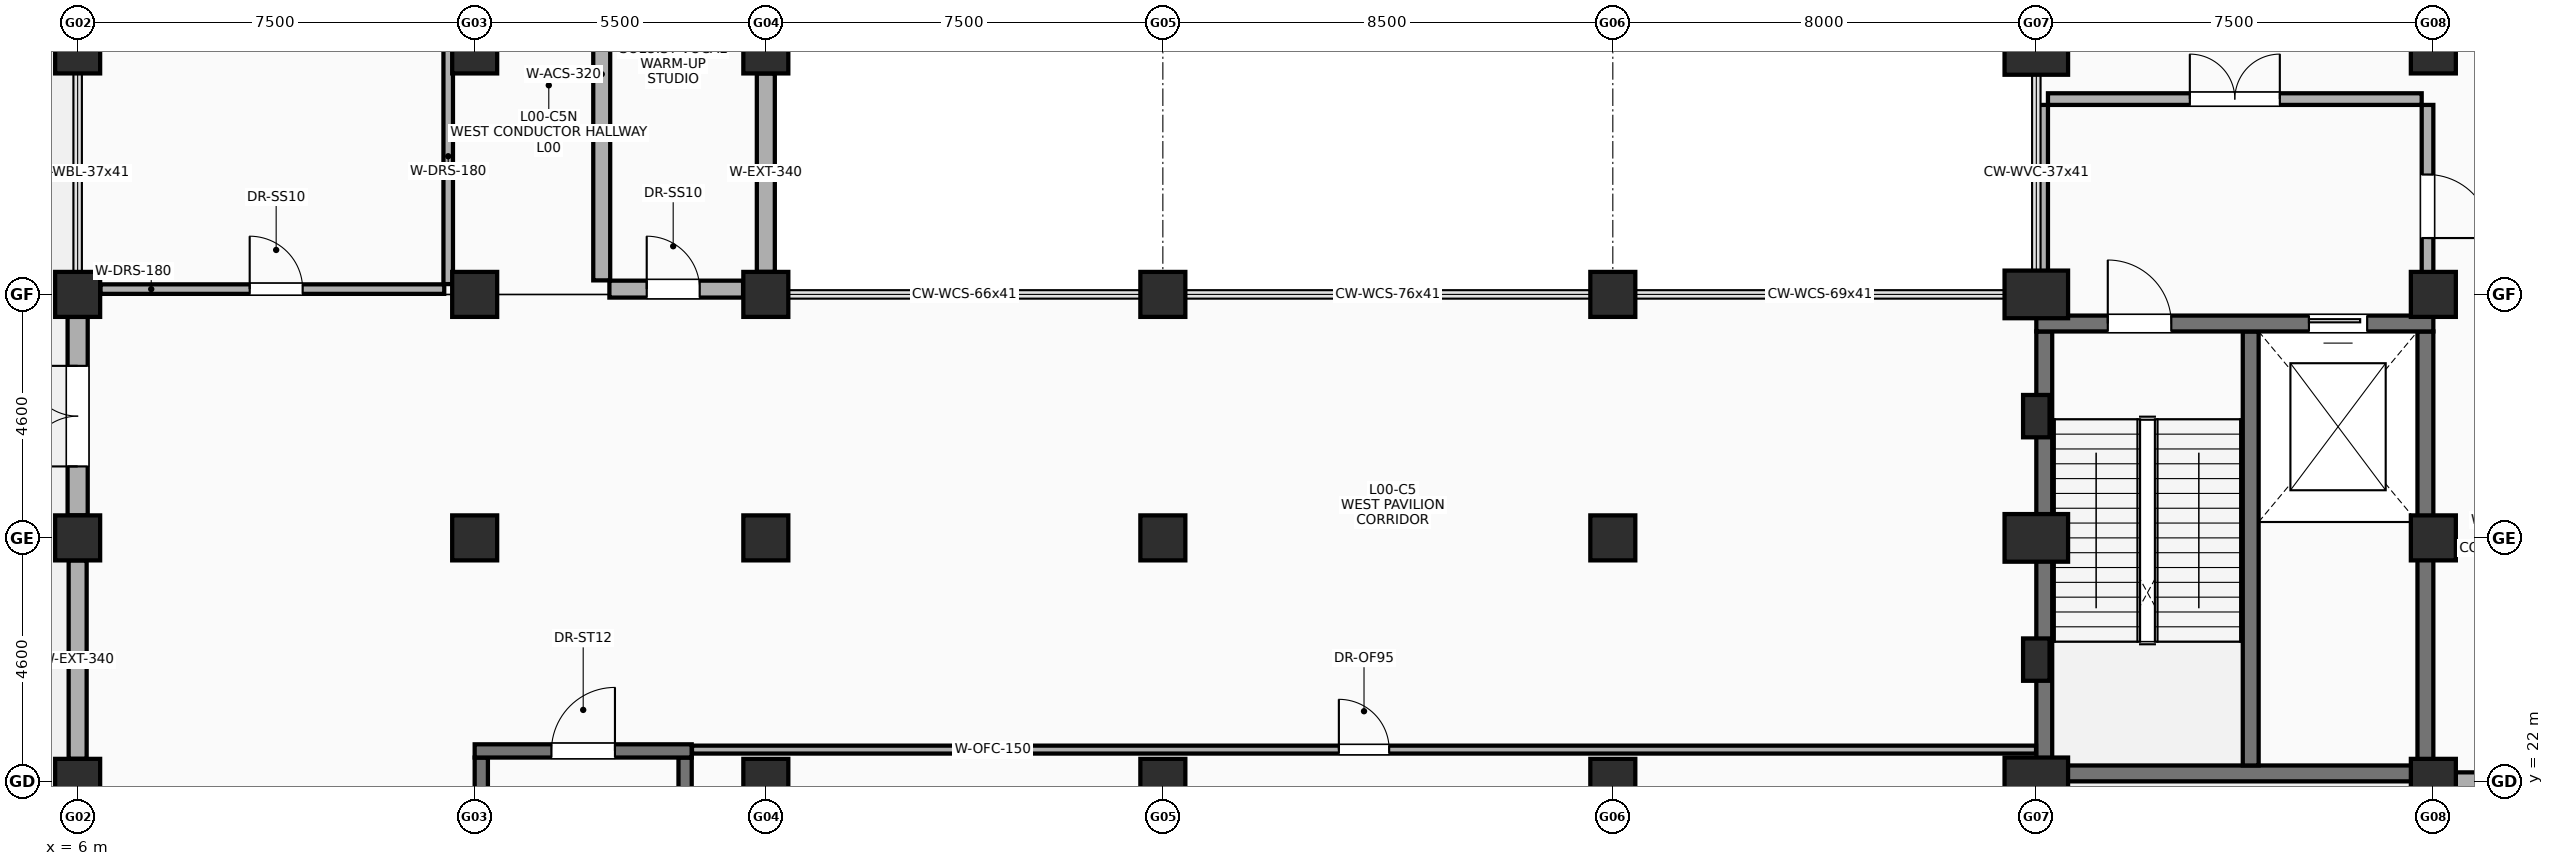
"""IFC4 building model, lengths in metres.
Left out: names, types, materials, properties, quantities, classifications, styles, units other than length and angle.
Written with IfcOpenShell. Run it as: python <this file> out.ifc"""

import sys

from ifc_helpers import new_model, si_unit, direction, frame, frame_2d, origin, origin_2d, place, context, subcontext, project, spatial, rectangle, extrude, element, fill, save


model = new_model("IFC4")
c1 = context("Model", 3, precision=1e-05, world=origin(), true_north=direction((0.0, 1.0)))
c2 = subcontext(c1, "Body", "Model", "MODEL_VIEW")
j1 = project(units=[si_unit("LENGTHUNIT", "METRE"), si_unit("PLANEANGLEUNIT", "RADIAN")], contexts=[c1])
p1 = place(None, origin())
s1 = spatial("IfcSite", under=j1, at=p1, CompositionType="ELEMENT")
p2 = place(p1, origin())
s2 = spatial("IfcBuilding", under=s1, at=p2, CompositionType="ELEMENT")
p3 = place(p2, origin())
s3 = spatial("IfcBuildingStorey", under=s2, at=p3, CompositionType="ELEMENT", Elevation=0.0)
for number, where, z_axis, x_axis in (
    (1, (6.0, 22.0, 0.0), (0.0, 0.0, 1.0), (1.0, 0.0, 0.0)),
    (2, (6.0, 26.6, 0.0), (0.0, 0.0, 1.0), (1.0, 0.0, 0.0)),
    (3, (6.0, 31.2, 0.0), (0.0, 0.0, 1.0), (1.0, 0.0, 0.0)),
    (4, (6.0, 35.8, 0.0), (0.0, 0.0, 1.0), (1.0, 0.0, 0.0)),
    (5, (13.5, 26.6, 0.0), (0.0, 0.0, 1.0), (1.0, 0.0, 0.0)),
    (6, (13.5, 31.2, 0.0), (0.0, 0.0, 1.0), (1.0, 0.0, 0.0)),
    (7, (13.5, 35.8, 0.0), (0.0, 0.0, 1.0), (1.0, 0.0, 0.0)),
    (8, (19.0, 22.0, 0.0), (0.0, 0.0, 1.0), (1.0, 0.0, 0.0)),
    (9, (19.0, 26.6, 0.0), (0.0, 0.0, 1.0), (1.0, 0.0, 0.0)),
    (10, (19.0, 31.2, 0.0), (0.0, 0.0, 1.0), (1.0, 0.0, 0.0)),
    (11, (19.0, 35.8, 0.0), (0.0, 0.0, 1.0), (1.0, 0.0, 0.0)),
    (12, (26.5, 22.0, 0.0), (0.0, 0.0, 1.0), (1.0, 0.0, 0.0)),
    (13, (26.5, 26.6, 0.0), (0.0, 0.0, 1.0), (1.0, 0.0, 0.0)),
    (14, (26.5, 31.2, 0.0), (0.0, 0.0, 1.0), (1.0, 0.0, 0.0)),
    (15, (35.0, 22.0, 0.0), (0.0, 0.0, 1.0), (1.0, 0.0, 0.0)),
    (16, (35.0, 26.6, 0.0), (0.0, 0.0, 1.0), (1.0, 0.0, 0.0)),
    (17, (35.0, 31.2, 0.0), (0.0, 0.0, 1.0), (1.0, 0.0, 0.0)),
):
    element("IfcColumn", number, at=place(p3, frame(where, z_axis=z_axis, x_axis=x_axis)), inside=s3, PredefinedType="COLUMN", context=c2, shape_type="SweptSolid", body=[
        extrude(rectangle(XDim=0.85, YDim=0.85, at=origin_2d()), origin(), (0.0, 0.0, 1.0), 5.4),
    ])
for number, where, z_axis, x_axis in (
    (18, (43.0, 22.0, 0.0), (0.0, 0.0, 1.0), (1.0, 0.0, 0.0)),
    (19, (43.0, 26.6, 0.0), (0.0, 0.0, 1.0), (1.0, 0.0, 0.0)),
    (20, (43.0, 31.2, 0.0), (0.0, 0.0, 1.0), (1.0, 0.0, 0.0)),
    (21, (43.0, 35.8, 0.0), (0.0, 0.0, 1.0), (1.0, 0.0, 0.0)),
):
    element("IfcColumn", number, at=place(p3, frame(where, z_axis=z_axis, x_axis=x_axis)), inside=s3, PredefinedType="COLUMN", context=c2, shape_type="SweptSolid", body=[
        extrude(rectangle(XDim=1.2, YDim=0.9, at=origin_2d()), origin(), (0.0, 0.0, 1.0), 5.4),
    ])
for number, where, z_axis, x_axis in (
    (22, (50.5, 22.0, 0.0), (0.0, 0.0, 1.0), (1.0, 0.0, 0.0)),
    (23, (50.5, 26.6, 0.0), (0.0, 0.0, 1.0), (1.0, 0.0, 0.0)),
    (24, (50.5, 31.2, 0.0), (0.0, 0.0, 1.0), (1.0, 0.0, 0.0)),
    (25, (50.5, 35.8, 0.0), (0.0, 0.0, 1.0), (1.0, 0.0, 0.0)),
):
    element("IfcColumn", number, at=place(p3, frame(where, z_axis=z_axis, x_axis=x_axis)), inside=s3, PredefinedType="COLUMN", context=c2, shape_type="SweptSolid", body=[
        extrude(rectangle(XDim=0.85, YDim=0.85, at=origin_2d()), origin(), (0.0, 0.0, 1.0), 5.4),
    ])
for number, where, z_axis, x_axis in (
    (26, (43.0, 24.3, 0.0), (0.0, 0.0, 1.0), (1.0, 0.0, 0.0)),
    (27, (43.0, 28.9, 0.0), (0.0, 0.0, 1.0), (1.0, 0.0, 0.0)),
):
    element("IfcColumn", number, at=place(p3, frame(where, z_axis=z_axis, x_axis=x_axis)), inside=s3, PredefinedType="PILASTER", context=c2, shape_type="SweptSolid", body=[
        extrude(rectangle(XDim=0.5, YDim=0.8, at=origin_2d()), origin(), (0.0, 0.0, 1.0), 5.4),
    ])
p4 = place(p3, frame((43.0, 22.15, 0.0), z_axis=(0.0, 0.0, 1.0), x_axis=(1.0, 0.0, 0.0)))
e28 = element("IfcWall", 28, at=p4, inside=s3, PredefinedType="SHEAR", context=c2, shape_type="SweptSolid", body=[
    extrude(rectangle(XDim=7.5, YDim=0.3, at=frame_2d((3.75, 0.0))), origin(), (0.0, 0.0, 1.0), 5.4),
])
for number, where, z_axis, x_axis in (
    (29, (43.15, 22.3, 0.0), (0.0, 0.0, 1.0), (0.0, 1.0, 0.0)),
    (30, (50.35, 22.3, 0.0), (0.0, 0.0, 1.0), (0.0, 1.0, 0.0)),
    (31, (47.05, 22.3, 0.0), (0.0, 0.0, 1.0), (0.0, 1.0, 0.0)),
):
    element("IfcWall", number, at=place(p3, frame(where, z_axis=z_axis, x_axis=x_axis)), inside=s3, PredefinedType="SHEAR", context=c2, shape_type="SweptSolid", body=[
        extrude(rectangle(XDim=8.2, YDim=0.3, at=frame_2d((4.1, 0.0))), origin(), (0.0, 0.0, 1.0), 5.4),
    ])
p5 = place(p3, frame((6.0, 27.025, 0.0), z_axis=(0.0, 0.0, 1.0), x_axis=(0.0, 1.0, 0.0)))
e32 = element("IfcWall", 32, at=p5, inside=s3, PredefinedType="SOLIDWALL", context=c2, shape_type="SweptSolid", body=[
    extrude(rectangle(XDim=3.75, YDim=0.38, at=frame_2d((1.875, 0.0))), origin(), (0.0, 0.0, 1.0), 4.15),
])
p6 = place(p5, frame((0.925, 0.0, 0.0)))
e33 = element("IfcOpeningElement", 33, at=p6, cuts=e32, PredefinedType="OPENING", context=c2, shape_type="SweptSolid", body=[
    extrude(rectangle(XDim=1.9, YDim=2.35, at=frame_2d((0.95, 1.175))), frame((0.0, 0.2, 0.0), z_axis=(0.0, -1.0, 0.0), x_axis=(1.0, 0.0, 0.0)), (0.0, 0.0, 1.0), 0.4),
])
for number, where, z_axis, x_axis in (
    (34, (6.0, 22.425, 0.0), (0.0, 0.0, 1.0), (0.0, 1.0, 0.0)),
    (35, (19.0, 31.625, 0.0), (0.0, 0.0, 1.0), (0.0, 1.0, 0.0)),
):
    element("IfcWall", number, at=place(p3, frame(where, z_axis=z_axis, x_axis=x_axis)), inside=s3, PredefinedType="SOLIDWALL", context=c2, shape_type="SweptSolid", body=[
        extrude(rectangle(XDim=3.75, YDim=0.34, at=frame_2d((1.875, 0.0))), origin(), (0.0, 0.0, 1.0), 4.15),
    ])
p7 = place(p3, frame((43.0, 30.65, 0.0), z_axis=(0.0, 0.0, 1.0), x_axis=(1.0, 0.0, 0.0)))
e36 = element("IfcWall", 36, at=p7, inside=s3, PredefinedType="SHEAR", context=c2, shape_type="SweptSolid", body=[
    extrude(rectangle(XDim=7.5, YDim=0.3, at=frame_2d((3.75, 0.0))), origin(), (0.0, 0.0, 1.0), 5.4),
])
p8 = place(p7, frame((1.35, 0.0, 0.0)))
e37 = element("IfcOpeningElement", 37, at=p8, cuts=e36, PredefinedType="OPENING", context=c2, shape_type="SweptSolid", body=[
    extrude(rectangle(XDim=1.2, YDim=2.15, at=frame_2d((0.6, 1.075))), frame((0.0, 0.16, 0.0), z_axis=(0.0, -1.0, 0.0), x_axis=(1.0, 0.0, 0.0)), (0.0, 0.0, 1.0), 0.32),
])
p9 = place(p7, frame((5.15, 0.0, 0.0)))
e38 = element("IfcOpeningElement", 38, at=p9, cuts=e36, PredefinedType="OPENING", context=c2, shape_type="SweptSolid", body=[
    extrude(rectangle(XDim=1.1, YDim=2.15, at=frame_2d((0.55, 1.075))), frame((0.0, 0.16, 0.0), z_axis=(0.0, -1.0, 0.0), x_axis=(1.0, 0.0, 0.0)), (0.0, 0.0, 1.0), 0.32),
])
p10 = place(p3, frame((43.22, 34.89, 0.0), z_axis=(0.0, 0.0, 1.0), x_axis=(1.0, 0.0, 0.0)))
e39 = element("IfcWall", 39, at=p10, inside=s3, PredefinedType="SOLIDWALL", context=c2, shape_type="SweptSolid", body=[
    extrude(rectangle(XDim=7.06, YDim=0.22, at=frame_2d((3.53, 0.0))), origin(), (0.0, 0.0, 1.0), 4.4),
])
p11 = place(p10, frame((2.68, 0.0, 0.0)))
e40 = element("IfcOpeningElement", 40, at=p11, cuts=e39, PredefinedType="OPENING", context=c2, shape_type="SweptSolid", body=[
    extrude(rectangle(XDim=1.7, YDim=2.18, at=frame_2d((0.85, 1.09))), frame((0.0, 0.12, 0.0), z_axis=(0.0, -1.0, 0.0), x_axis=(1.0, 0.0, 0.0)), (0.0, 0.0, 1.0), 0.24),
])
p12 = place(p3, frame((43.11, 30.95, 0.0), z_axis=(0.0, 0.0, 1.0), x_axis=(0.0, 1.0, 0.0)))
e41 = element("IfcWall", 41, at=p12, inside=s3, PredefinedType="SOLIDWALL", context=c2, shape_type="SweptSolid", body=[
    extrude(rectangle(XDim=3.83, YDim=0.22, at=frame_2d((1.915, 0.0))), origin(), (0.0, 0.0, 1.0), 4.4),
])
p13 = place(p3, frame((50.39, 30.95, 0.0), z_axis=(0.0, 0.0, 1.0), x_axis=(0.0, 1.0, 0.0)))
e42 = element("IfcWall", 42, at=p13, inside=s3, PredefinedType="SOLIDWALL", context=c2, shape_type="SweptSolid", body=[
    extrude(rectangle(XDim=3.83, YDim=0.22, at=frame_2d((1.915, 0.0))), origin(), (0.0, 0.0, 1.0), 4.2),
])
p14 = place(p13, frame((2.515, 0.0, 0.0), z_axis=(0.0, 0.0, 1.0), x_axis=(-1.0, 0.0, 0.0)))
e43 = element("IfcOpeningElement", 43, at=p14, cuts=e42, PredefinedType="OPENING", context=c2, shape_type="SweptSolid", body=[
    extrude(rectangle(XDim=1.2, YDim=2.15, at=frame_2d((0.6, 1.075))), frame((0.0, 0.12, 0.0), z_axis=(0.0, -1.0, 0.0), x_axis=(1.0, 0.0, 0.0)), (0.0, 0.0, 1.0), 0.24),
])
for number, where, z_axis, x_axis in (
    (44, (13.625, 14.25, 0.0), (0.0, 0.0, 1.0), (0.0, 1.0, 0.0)),
    (45, (17.475, 14.25, 0.0), (0.0, 0.0, 1.0), (0.0, 1.0, 0.0)),
):
    element("IfcWall", number, at=place(p3, frame(where, z_axis=z_axis, x_axis=x_axis)), inside=s3, PredefinedType="SHEAR", context=c2, shape_type="SweptSolid", body=[
        extrude(rectangle(XDim=8.2, YDim=0.25, at=frame_2d((4.1, 0.0))), origin(), (0.0, 0.0, 1.0), 5.4),
    ])
p15 = place(p3, frame((13.5, 22.575, 0.0), z_axis=(0.0, 0.0, 1.0), x_axis=(1.0, 0.0, 0.0)))
e46 = element("IfcWall", 46, at=p15, inside=s3, PredefinedType="SHEAR", context=c2, shape_type="SweptSolid", body=[
    extrude(rectangle(XDim=4.1, YDim=0.25, at=frame_2d((2.05, 0.0))), origin(), (0.0, 0.0, 1.0), 5.4),
])
p16 = place(p15, frame((1.45, 0.0, 0.0)))
e47 = element("IfcOpeningElement", 47, at=p16, cuts=e46, PredefinedType="OPENING", context=c2, shape_type="SweptSolid", body=[
    extrude(rectangle(XDim=1.2, YDim=2.15, at=frame_2d((0.6, 1.075))), frame((0.0, 0.135, 0.0), z_axis=(0.0, -1.0, 0.0), x_axis=(1.0, 0.0, 0.0)), (0.0, 0.0, 1.0), 0.27),
])
p17 = place(p3, frame((6.43, 31.3, 0.0), z_axis=(0.0, 0.0, 1.0), x_axis=(1.0, 0.0, 0.0)))
e48 = element("IfcWall", 48, at=p17, inside=s3, PredefinedType="PARTITIONING", context=c2, shape_type="SweptSolid", body=[
    extrude(rectangle(XDim=6.495, YDim=0.18, at=frame_2d((3.248, 0.0))), origin(), (0.0, 0.0, 1.0), 4.2),
])
p18 = place(p17, frame((2.82, 0.0, 0.0)))
e49 = element("IfcOpeningElement", 49, at=p18, cuts=e48, PredefinedType="OPENING", context=c2, shape_type="SweptSolid", body=[
    extrude(rectangle(XDim=1.0, YDim=2.2, at=frame_2d((0.5, 1.1))), frame((0.0, 0.1, 0.0), z_axis=(0.0, -1.0, 0.0), x_axis=(1.0, 0.0, 0.0)), (0.0, 0.0, 1.0), 0.2),
])
p19 = place(p3, frame((15.9, 31.465, 0.0), z_axis=(0.0, 0.0, 1.0), x_axis=(0.0, 1.0, 0.0)))
e50 = element("IfcWall", 50, at=p19, inside=s3, PredefinedType="PARTITIONING", context=c2, shape_type="SweptSolid", body=[
    extrude(rectangle(XDim=17.49, YDim=0.32, at=frame_2d((8.745, 0.0))), origin(), (0.0, 0.0, 1.0), 4.4),
])
p20 = place(p19, frame((8.385, 0.0, 0.0)))
e51 = element("IfcOpeningElement", 51, at=p20, cuts=e50, PredefinedType="OPENING", context=c2, shape_type="SweptSolid", body=[
    extrude(rectangle(XDim=1.0, YDim=2.2, at=frame_2d((0.5, 1.1))), frame((0.0, 0.17, 0.0), z_axis=(0.0, -1.0, 0.0), x_axis=(1.0, 0.0, 0.0)), (0.0, 0.0, 1.0), 0.34),
])
p21 = place(p3, frame((16.045, 31.3, 0.0), z_axis=(0.0, 0.0, 1.0), x_axis=(1.0, 0.0, 0.0)))
e52 = element("IfcWall", 52, at=p21, inside=s3, PredefinedType="PARTITIONING", context=c2, shape_type="SweptSolid", body=[
    extrude(rectangle(XDim=2.525, YDim=0.32, at=frame_2d((1.263, 0.0))), origin(), (0.0, 0.0, 1.0), 4.4),
])
p22 = place(p21, frame((0.705, 0.0, 0.0)))
e53 = element("IfcOpeningElement", 53, at=p22, cuts=e52, PredefinedType="OPENING", context=c2, shape_type="SweptSolid", body=[
    extrude(rectangle(XDim=1.0, YDim=2.2, at=frame_2d((0.5, 1.1))), frame((0.0, 0.17, 0.0), z_axis=(0.0, -1.0, 0.0), x_axis=(1.0, 0.0, 0.0)), (0.0, 0.0, 1.0), 0.34),
])
p23 = place(p3, frame((17.605, 22.6, 0.0), z_axis=(0.0, 0.0, 1.0), x_axis=(1.0, 0.0, 0.0)))
e54 = element("IfcWall", 54, at=p23, inside=s3, PredefinedType="PARTITIONING", context=c2, shape_type="SweptSolid", body=[
    extrude(rectangle(XDim=25.39, YDim=0.15, at=frame_2d((12.695, 0.0))), origin(), (0.0, 0.0, 1.0), 4.4),
])
p24 = place(p23, frame((12.22, 0.0, 0.0)))
e55 = element("IfcOpeningElement", 55, at=p24, cuts=e54, PredefinedType="OPENING", context=c2, shape_type="SweptSolid", body=[
    extrude(rectangle(XDim=0.95, YDim=2.15, at=frame_2d((0.475, 1.075))), frame((0.0, 0.085, 0.0), z_axis=(0.0, -1.0, 0.0), x_axis=(1.0, 0.0, 0.0)), (0.0, 0.0, 1.0), 0.17),
])
p25 = place(p3, frame((13.0, 31.395, 0.0), z_axis=(0.0, 0.0, 1.0), x_axis=(0.0, 1.0, 0.0)))
e56 = element("IfcWall", 56, at=p25, inside=s3, PredefinedType="PARTITIONING", context=c2, shape_type="SweptSolid", body=[
    extrude(rectangle(XDim=4.83, YDim=0.18, at=frame_2d((2.415, 0.0))), origin(), (0.0, 0.0, 1.0), 4.2),
])
p26 = place(p3, frame((50.925, 22.0, 0.0), z_axis=(0.0, 0.0, 1.0), x_axis=(1.0, 0.0, 0.0)))
e57 = element("IfcWall", 57, at=p26, inside=s3, PredefinedType="SOLIDWALL", context=c2, shape_type="SweptSolid", body=[
    extrude(rectangle(XDim=0.855, YDim=0.34, at=frame_2d((0.427, 0.0))), origin(), (0.0, 0.0, 1.0), 4.15),
])
p27 = place(p6, origin())
e58 = element("IfcDoor", 58, at=p27, inside=s3, OperationType="DOUBLE_DOOR_SINGLE_SWING", PredefinedType="DOOR", context=c2, shape_type="SweptSolid", body=[
    extrude(rectangle(XDim=1.9, YDim=2.35, at=frame_2d((0.95, 1.175))), frame((0.0, 0.025, 0.0), z_axis=(0.0, -1.0, 0.0), x_axis=(1.0, 0.0, 0.0)), (0.0, 0.0, 1.0), 0.05),
])
fill(e33, e58)
p28 = place(p8, origin())
e59 = element("IfcDoor", 59, at=p28, inside=s3, OperationType="SINGLE_SWING_LEFT", PredefinedType="DOOR", context=c2, shape_type="SweptSolid", body=[
    extrude(rectangle(XDim=1.2, YDim=2.15, at=frame_2d((0.6, 1.075))), frame((0.0, 0.025, 0.0), z_axis=(0.0, -1.0, 0.0), x_axis=(1.0, 0.0, 0.0)), (0.0, 0.0, 1.0), 0.05),
])
fill(e37, e59)
p29 = place(p9, origin())
e60 = element("IfcDoor", 60, at=p29, inside=s3, OperationType="SLIDING_TO_LEFT", PredefinedType="DOOR", context=c2, shape_type="SweptSolid", body=[
    extrude(rectangle(XDim=1.1, YDim=2.15, at=frame_2d((0.55, 1.075))), frame((0.0, 0.025, 0.0), z_axis=(0.0, -1.0, 0.0), x_axis=(1.0, 0.0, 0.0)), (0.0, 0.0, 1.0), 0.05),
])
fill(e38, e60)
p30 = place(p11, origin())
e61 = element("IfcDoor", 61, at=p30, inside=s3, OperationType="DOUBLE_DOOR_SINGLE_SWING", PredefinedType="DOOR", context=c2, shape_type="SweptSolid", body=[
    extrude(rectangle(XDim=1.7, YDim=2.18, at=frame_2d((0.85, 1.09))), frame((0.0, 0.025, 0.0), z_axis=(0.0, -1.0, 0.0), x_axis=(1.0, 0.0, 0.0)), (0.0, 0.0, 1.0), 0.05),
])
fill(e40, e61)
p31 = place(p14, origin())
e62 = element("IfcDoor", 62, at=p31, inside=s3, OperationType="SINGLE_SWING_RIGHT", PredefinedType="DOOR", context=c2, shape_type="SweptSolid", body=[
    extrude(rectangle(XDim=1.2, YDim=2.15, at=frame_2d((0.6, 1.075))), frame((0.0, 0.025, 0.0), z_axis=(0.0, -1.0, 0.0), x_axis=(1.0, 0.0, 0.0)), (0.0, 0.0, 1.0), 0.05),
])
fill(e43, e62)
p32 = place(p16, origin())
e63 = element("IfcDoor", 63, at=p32, inside=s3, OperationType="SINGLE_SWING_RIGHT", PredefinedType="DOOR", context=c2, shape_type="SweptSolid", body=[
    extrude(rectangle(XDim=1.2, YDim=2.15, at=frame_2d((0.6, 1.075))), frame((0.0, 0.025, 0.0), z_axis=(0.0, -1.0, 0.0), x_axis=(1.0, 0.0, 0.0)), (0.0, 0.0, 1.0), 0.05),
])
fill(e47, e63)
p33 = place(p18, origin())
e64 = element("IfcDoor", 64, at=p33, inside=s3, OperationType="SINGLE_SWING_LEFT", PredefinedType="DOOR", context=c2, shape_type="SweptSolid", body=[
    extrude(rectangle(XDim=1.0, YDim=2.2, at=frame_2d((0.5, 1.1))), frame((0.0, 0.025, 0.0), z_axis=(0.0, -1.0, 0.0), x_axis=(1.0, 0.0, 0.0)), (0.0, 0.0, 1.0), 0.05),
])
fill(e49, e64)
p34 = place(p22, origin())
e65 = element("IfcDoor", 65, at=p34, inside=s3, OperationType="SINGLE_SWING_LEFT", PredefinedType="DOOR", context=c2, shape_type="SweptSolid", body=[
    extrude(rectangle(XDim=1.0, YDim=2.2, at=frame_2d((0.5, 1.1))), frame((0.0, 0.025, 0.0), z_axis=(0.0, -1.0, 0.0), x_axis=(1.0, 0.0, 0.0)), (0.0, 0.0, 1.0), 0.05),
])
fill(e53, e65)
p35 = place(p24, origin())
e66 = element("IfcDoor", 66, at=p35, inside=s3, OperationType="SINGLE_SWING_LEFT", PredefinedType="DOOR", context=c2, shape_type="SweptSolid", body=[
    extrude(rectangle(XDim=0.95, YDim=2.15, at=frame_2d((0.475, 1.075))), frame((0.0, 0.025, 0.0), z_axis=(0.0, -1.0, 0.0), x_axis=(1.0, 0.0, 0.0)), (0.0, 0.0, 1.0), 0.05),
])
fill(e55, e66)
save(model, sys.argv[1])
